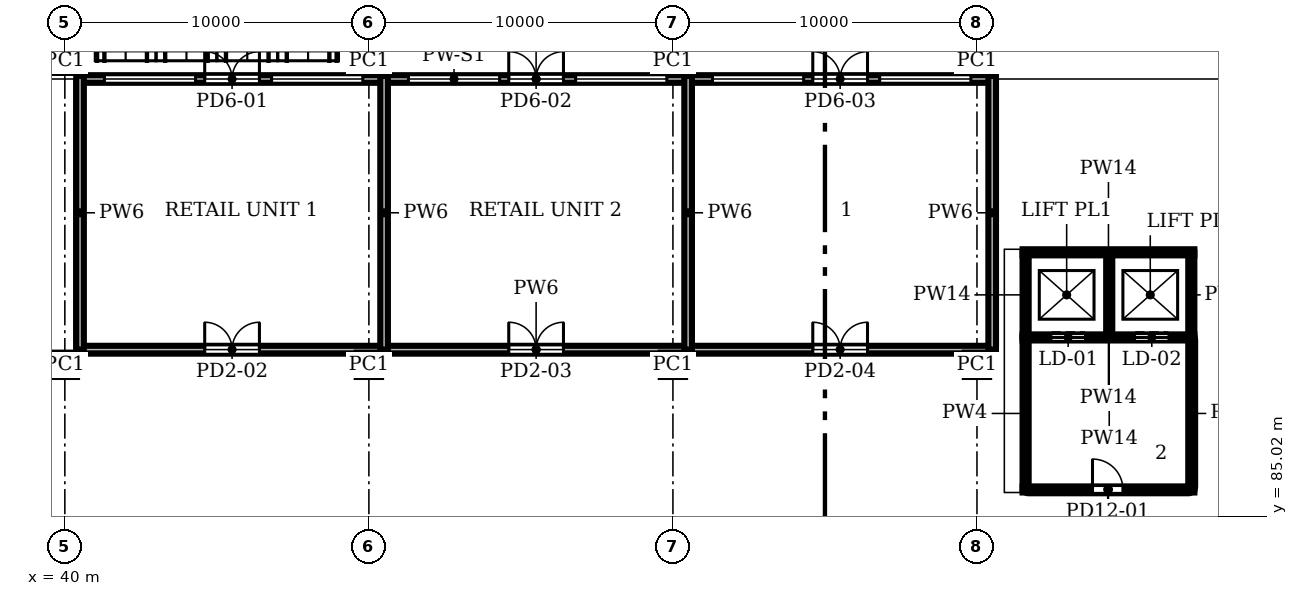
"""IFC4 building model, lengths in metres.
Left out: names, types, materials, properties, quantities, classifications, styles, units other than length and angle.
Written with IfcOpenShell. Run it as: python <this file> out.ifc"""

import sys

from ifc_helpers import new_model, si_unit, direction, frame, frame_2d, origin, origin_2d, place, context, subcontext, project, spatial, rectangle, extrude, element, fill, save


model = new_model("IFC4")
c1 = context("Model", 3, precision=1e-05, world=origin(), true_north=direction((0.0, 1.0)))
c2 = subcontext(c1, "Body", "Model", "MODEL_VIEW")
j1 = project(units=[si_unit("LENGTHUNIT", "METRE"), si_unit("PLANEANGLEUNIT", "RADIAN")], contexts=[c1])
p1 = place(None, origin())
s1 = spatial("IfcSite", under=j1, at=p1, CompositionType="ELEMENT")
p2 = place(p1, origin())
s2 = spatial("IfcBuilding", under=s1, at=p2, CompositionType="ELEMENT")
p3 = place(p2, origin())
s3 = spatial("IfcBuildingStorey", under=s2, at=p3, CompositionType="ELEMENT", Elevation=0.0)
for number, where, z_axis, x_axis in (
    (1, (40.0, 90.0, -0.1), (0.0, 0.0, 1.0), (1.0, 0.0, 0.0)),
    (2, (40.0, 100.0, -0.1), (0.0, 0.0, 1.0), (1.0, 0.0, 0.0)),
    (3, (50.0, 90.0, -0.1), (0.0, 0.0, 1.0), (1.0, 0.0, 0.0)),
    (4, (50.0, 100.0, -0.1), (0.0, 0.0, 1.0), (1.0, 0.0, 0.0)),
    (5, (60.0, 90.0, -0.1), (0.0, 0.0, 1.0), (1.0, 0.0, 0.0)),
    (6, (60.0, 100.0, -0.1), (0.0, 0.0, 1.0), (1.0, 0.0, 0.0)),
    (7, (70.0, 90.0, -0.1), (0.0, 0.0, 1.0), (1.0, 0.0, 0.0)),
    (8, (70.0, 100.0, -0.1), (0.0, 0.0, 1.0), (1.0, 0.0, 0.0)),
):
    element("IfcColumn", number, at=place(p3, frame(where, z_axis=z_axis, x_axis=x_axis)), inside=s3, PredefinedType="COLUMN", context=c2, shape_type="SweptSolid", body=[
        extrude(rectangle(XDim=0.8, YDim=0.8, at=origin_2d()), origin(), (0.0, 0.0, 1.0), 5.65),
    ])
p4 = place(p3, frame((40.5, 99.4, 0.0), z_axis=(0.0, 0.0, 1.0), x_axis=(1.0, 0.0, 0.0)))
e9 = element("IfcWall", 9, at=p4, inside=s3, PredefinedType="STANDARD", context=c2, shape_type="SweptSolid", body=[
    extrude(rectangle(XDim=30.0, YDim=0.25, at=frame_2d((15.0, 0.0))), origin(), (0.0, 0.0, 1.0), 5.55),
])
p5 = place(p4, frame((0.8, 0.0, 0.3)))
e10 = element("IfcOpeningElement", 10, at=p5, cuts=e9, PredefinedType="OPENING", context=c2, shape_type="SweptSolid", body=[
    extrude(rectangle(XDim=3.0, YDim=2.6, at=frame_2d((1.5, 1.3))), frame((0.0, 0.135, 0.0), z_axis=(0.0, -1.0, 0.0), x_axis=(1.0, 0.0, 0.0)), (0.0, 0.0, 1.0), 0.27),
])
p6 = place(p4, frame((4.1, 0.0, 0.0)))
e11 = element("IfcOpeningElement", 11, at=p6, cuts=e9, PredefinedType="OPENING", context=c2, shape_type="SweptSolid", body=[
    extrude(rectangle(XDim=1.8, YDim=2.4, at=frame_2d((0.9, 1.2))), frame((0.0, 0.135, 0.0), z_axis=(0.0, -1.0, 0.0), x_axis=(1.0, 0.0, 0.0)), (0.0, 0.0, 1.0), 0.27),
])
p7 = place(p4, frame((6.3, 0.0, 0.3)))
e12 = element("IfcOpeningElement", 12, at=p7, cuts=e9, PredefinedType="OPENING", context=c2, shape_type="SweptSolid", body=[
    extrude(rectangle(XDim=3.0, YDim=2.6, at=frame_2d((1.5, 1.3))), frame((0.0, 0.135, 0.0), z_axis=(0.0, -1.0, 0.0), x_axis=(1.0, 0.0, 0.0)), (0.0, 0.0, 1.0), 0.27),
])
p8 = place(p4, frame((10.8, 0.0, 0.3)))
e13 = element("IfcOpeningElement", 13, at=p8, cuts=e9, PredefinedType="OPENING", context=c2, shape_type="SweptSolid", body=[
    extrude(rectangle(XDim=3.0, YDim=2.6, at=frame_2d((1.5, 1.3))), frame((0.0, 0.135, 0.0), z_axis=(0.0, -1.0, 0.0), x_axis=(1.0, 0.0, 0.0)), (0.0, 0.0, 1.0), 0.27),
])
p9 = place(p4, frame((14.1, 0.0, 0.0)))
e14 = element("IfcOpeningElement", 14, at=p9, cuts=e9, PredefinedType="OPENING", context=c2, shape_type="SweptSolid", body=[
    extrude(rectangle(XDim=1.8, YDim=2.4, at=frame_2d((0.9, 1.2))), frame((0.0, 0.135, 0.0), z_axis=(0.0, -1.0, 0.0), x_axis=(1.0, 0.0, 0.0)), (0.0, 0.0, 1.0), 0.27),
])
p10 = place(p4, frame((16.3, 0.0, 0.3)))
e15 = element("IfcOpeningElement", 15, at=p10, cuts=e9, PredefinedType="OPENING", context=c2, shape_type="SweptSolid", body=[
    extrude(rectangle(XDim=3.0, YDim=2.6, at=frame_2d((1.5, 1.3))), frame((0.0, 0.135, 0.0), z_axis=(0.0, -1.0, 0.0), x_axis=(1.0, 0.0, 0.0)), (0.0, 0.0, 1.0), 0.27),
])
p11 = place(p4, frame((20.8, 0.0, 0.3)))
e16 = element("IfcOpeningElement", 16, at=p11, cuts=e9, PredefinedType="OPENING", context=c2, shape_type="SweptSolid", body=[
    extrude(rectangle(XDim=3.0, YDim=2.6, at=frame_2d((1.5, 1.3))), frame((0.0, 0.135, 0.0), z_axis=(0.0, -1.0, 0.0), x_axis=(1.0, 0.0, 0.0)), (0.0, 0.0, 1.0), 0.27),
])
p12 = place(p4, frame((24.1, 0.0, 0.0)))
e17 = element("IfcOpeningElement", 17, at=p12, cuts=e9, PredefinedType="OPENING", context=c2, shape_type="SweptSolid", body=[
    extrude(rectangle(XDim=1.8, YDim=2.4, at=frame_2d((0.9, 1.2))), frame((0.0, 0.135, 0.0), z_axis=(0.0, -1.0, 0.0), x_axis=(1.0, 0.0, 0.0)), (0.0, 0.0, 1.0), 0.27),
])
p13 = place(p4, frame((26.3, 0.0, 0.3)))
e18 = element("IfcOpeningElement", 18, at=p13, cuts=e9, PredefinedType="OPENING", context=c2, shape_type="SweptSolid", body=[
    extrude(rectangle(XDim=3.0, YDim=2.6, at=frame_2d((1.5, 1.3))), frame((0.0, 0.135, 0.0), z_axis=(0.0, -1.0, 0.0), x_axis=(1.0, 0.0, 0.0)), (0.0, 0.0, 1.0), 0.27),
])
p14 = place(p3, frame((40.5, 90.5, 0.0), z_axis=(0.0, 0.0, 1.0), x_axis=(1.0, 0.0, 0.0)))
e19 = element("IfcWall", 19, at=p14, inside=s3, PredefinedType="STANDARD", context=c2, shape_type="SweptSolid", body=[
    extrude(rectangle(XDim=30.0, YDim=0.25, at=frame_2d((15.0, 0.0))), origin(), (0.0, 0.0, 1.0), 5.55),
])
p15 = place(p14, frame((4.1, 0.0, 0.0)))
e20 = element("IfcOpeningElement", 20, at=p15, cuts=e19, PredefinedType="OPENING", context=c2, shape_type="SweptSolid", body=[
    extrude(rectangle(XDim=1.8, YDim=2.1, at=frame_2d((0.9, 1.05))), frame((0.0, 0.135, 0.0), z_axis=(0.0, -1.0, 0.0), x_axis=(1.0, 0.0, 0.0)), (0.0, 0.0, 1.0), 0.27),
])
p16 = place(p14, frame((14.1, 0.0, 0.0)))
e21 = element("IfcOpeningElement", 21, at=p16, cuts=e19, PredefinedType="OPENING", context=c2, shape_type="SweptSolid", body=[
    extrude(rectangle(XDim=1.8, YDim=2.1, at=frame_2d((0.9, 1.05))), frame((0.0, 0.135, 0.0), z_axis=(0.0, -1.0, 0.0), x_axis=(1.0, 0.0, 0.0)), (0.0, 0.0, 1.0), 0.27),
])
p17 = place(p14, frame((24.1, 0.0, 0.0)))
e22 = element("IfcOpeningElement", 22, at=p17, cuts=e19, PredefinedType="OPENING", context=c2, shape_type="SweptSolid", body=[
    extrude(rectangle(XDim=1.8, YDim=2.1, at=frame_2d((0.9, 1.05))), frame((0.0, 0.135, 0.0), z_axis=(0.0, -1.0, 0.0), x_axis=(1.0, 0.0, 0.0)), (0.0, 0.0, 1.0), 0.27),
])
for number, where, z_axis, x_axis in (
    (23, (40.5, 90.5, 0.0), (0.0, 0.0, 1.0), (0.0, 1.0, 0.0)),
    (24, (50.5, 90.5, 0.0), (0.0, 0.0, 1.0), (0.0, 1.0, 0.0)),
    (25, (60.5, 90.5, 0.0), (0.0, 0.0, 1.0), (0.0, 1.0, 0.0)),
    (26, (70.5, 90.5, 0.0), (0.0, 0.0, 1.0), (0.0, 1.0, 0.0)),
):
    element("IfcWall", number, at=place(p3, frame(where, z_axis=z_axis, x_axis=x_axis)), inside=s3, PredefinedType="STANDARD", context=c2, shape_type="SweptSolid", body=[
        extrude(rectangle(XDim=9.0, YDim=0.25, at=frame_2d((4.5, 0.0))), origin(), (0.0, 0.0, 1.0), 5.55),
    ])
p18 = place(p3, frame((71.5, 90.9, 0.0), z_axis=(0.0, 0.0, 1.0), x_axis=(1.0, 0.0, 0.0)))
e27 = element("IfcWall", 27, at=p18, inside=s3, PredefinedType="SOLIDWALL", context=c2, shape_type="SweptSolid", body=[
    extrude(rectangle(XDim=5.65, YDim=0.2, at=frame_2d((2.825, 0.0))), origin(), (0.0, 0.0, 1.0), 6.0),
])
p19 = place(p18, frame((0.95, 0.0, 0.0)))
e28 = element("IfcOpeningElement", 28, at=p19, cuts=e27, PredefinedType="OPENING", context=c2, shape_type="SweptSolid", body=[
    extrude(rectangle(XDim=1.1, YDim=2.1, at=frame_2d((0.55, 1.05))), frame((0.0, 0.11, 0.0), z_axis=(0.0, -1.0, 0.0), x_axis=(1.0, 0.0, 0.0)), (0.0, 0.0, 1.0), 0.22),
])
p20 = place(p18, frame((3.7, 0.0, 0.0)))
e29 = element("IfcOpeningElement", 29, at=p20, cuts=e27, PredefinedType="OPENING", context=c2, shape_type="SweptSolid", body=[
    extrude(rectangle(XDim=1.1, YDim=2.1, at=frame_2d((0.55, 1.05))), frame((0.0, 0.11, 0.0), z_axis=(0.0, -1.0, 0.0), x_axis=(1.0, 0.0, 0.0)), (0.0, 0.0, 1.0), 0.22),
])
p21 = place(p3, frame((71.5, 93.7, 0.0), z_axis=(0.0, 0.0, 1.0), x_axis=(1.0, 0.0, 0.0)))
e30 = element("IfcWall", 30, at=p21, inside=s3, PredefinedType="SOLIDWALL", context=c2, shape_type="SweptSolid", body=[
    extrude(rectangle(XDim=5.65, YDim=0.2, at=frame_2d((2.825, 0.0))), origin(), (0.0, 0.0, 1.0), 6.0),
])
for number, where, z_axis, x_axis in (
    (31, (71.6, 90.9, 0.0), (0.0, 0.0, 1.0), (0.0, 1.0, 0.0)),
    (32, (74.35, 90.9, 0.0), (0.0, 0.0, 1.0), (0.0, 1.0, 0.0)),
    (33, (77.05, 90.9, 0.0), (0.0, 0.0, 1.0), (0.0, 1.0, 0.0)),
):
    element("IfcWall", number, at=place(p3, frame(where, z_axis=z_axis, x_axis=x_axis)), inside=s3, PredefinedType="SOLIDWALL", context=c2, shape_type="SweptSolid", body=[
        extrude(rectangle(XDim=2.8, YDim=0.2, at=frame_2d((1.4, 0.0))), origin(), (0.0, 0.0, 1.0), 6.0),
    ])
for number, where, z_axis, x_axis in (
    (34, (71.6, 85.9, 0.0), (0.0, 0.0, 1.0), (0.0, 1.0, 0.0)),
    (35, (77.05, 85.9, 0.0), (0.0, 0.0, 1.0), (0.0, 1.0, 0.0)),
):
    element("IfcWall", number, at=place(p3, frame(where, z_axis=z_axis, x_axis=x_axis)), inside=s3, PredefinedType="PARTITIONING", context=c2, shape_type="SweptSolid", body=[
        extrude(rectangle(XDim=5.0, YDim=0.2, at=frame_2d((2.5, 0.0))), origin(), (0.0, 0.0, 1.0), 5.55),
    ])
p22 = place(p3, frame((71.5, 85.9, 0.0), z_axis=(0.0, 0.0, 1.0), x_axis=(1.0, 0.0, 0.0)))
e36 = element("IfcWall", 36, at=p22, inside=s3, PredefinedType="PARTITIONING", context=c2, shape_type="SweptSolid", body=[
    extrude(rectangle(XDim=5.65, YDim=0.2, at=frame_2d((2.825, 0.0))), origin(), (0.0, 0.0, 1.0), 5.55),
])
p23 = place(p22, frame((2.3, 0.0, 0.0)))
e37 = element("IfcOpeningElement", 37, at=p23, cuts=e36, PredefinedType="OPENING", context=c2, shape_type="SweptSolid", body=[
    extrude(rectangle(XDim=1.0, YDim=2.1, at=frame_2d((0.5, 1.05))), frame((0.0, 0.11, 0.0), z_axis=(0.0, -1.0, 0.0), x_axis=(1.0, 0.0, 0.0)), (0.0, 0.0, 1.0), 0.22),
])
p24 = place(p5, origin())
e38 = element("IfcWindow", 38, at=p24, inside=s3, PartitioningType="SINGLE_PANEL", PredefinedType="WINDOW", context=c2, shape_type="SweptSolid", body=[
    extrude(rectangle(XDim=3.0, YDim=2.6, at=frame_2d((1.5, 1.3))), frame((0.0, 0.03, 0.0), z_axis=(0.0, -1.0, 0.0), x_axis=(1.0, 0.0, 0.0)), (0.0, 0.0, 1.0), 0.06),
])
fill(e10, e38)
p25 = place(p6, origin())
e39 = element("IfcDoor", 39, at=p25, inside=s3, OperationType="DOUBLE_DOOR_SINGLE_SWING", PredefinedType="DOOR", context=c2, shape_type="SweptSolid", body=[
    extrude(rectangle(XDim=1.8, YDim=2.4, at=frame_2d((0.9, 1.2))), frame((0.0, 0.025, 0.0), z_axis=(0.0, -1.0, 0.0), x_axis=(1.0, 0.0, 0.0)), (0.0, 0.0, 1.0), 0.05),
])
fill(e11, e39)
p26 = place(p7, origin())
e40 = element("IfcWindow", 40, at=p26, inside=s3, PartitioningType="SINGLE_PANEL", PredefinedType="WINDOW", context=c2, shape_type="SweptSolid", body=[
    extrude(rectangle(XDim=3.0, YDim=2.6, at=frame_2d((1.5, 1.3))), frame((0.0, 0.03, 0.0), z_axis=(0.0, -1.0, 0.0), x_axis=(1.0, 0.0, 0.0)), (0.0, 0.0, 1.0), 0.06),
])
fill(e12, e40)
p27 = place(p15, origin())
e41 = element("IfcDoor", 41, at=p27, inside=s3, OperationType="DOUBLE_DOOR_SINGLE_SWING", PredefinedType="DOOR", context=c2, shape_type="SweptSolid", body=[
    extrude(rectangle(XDim=1.8, YDim=2.1, at=frame_2d((0.9, 1.05))), frame((0.0, 0.025, 0.0), z_axis=(0.0, -1.0, 0.0), x_axis=(1.0, 0.0, 0.0)), (0.0, 0.0, 1.0), 0.05),
])
fill(e20, e41)
p28 = place(p8, origin())
e42 = element("IfcWindow", 42, at=p28, inside=s3, PartitioningType="SINGLE_PANEL", PredefinedType="WINDOW", context=c2, shape_type="SweptSolid", body=[
    extrude(rectangle(XDim=3.0, YDim=2.6, at=frame_2d((1.5, 1.3))), frame((0.0, 0.03, 0.0), z_axis=(0.0, -1.0, 0.0), x_axis=(1.0, 0.0, 0.0)), (0.0, 0.0, 1.0), 0.06),
])
fill(e13, e42)
p29 = place(p9, origin())
e43 = element("IfcDoor", 43, at=p29, inside=s3, OperationType="DOUBLE_DOOR_SINGLE_SWING", PredefinedType="DOOR", context=c2, shape_type="SweptSolid", body=[
    extrude(rectangle(XDim=1.8, YDim=2.4, at=frame_2d((0.9, 1.2))), frame((0.0, 0.025, 0.0), z_axis=(0.0, -1.0, 0.0), x_axis=(1.0, 0.0, 0.0)), (0.0, 0.0, 1.0), 0.05),
])
fill(e14, e43)
p30 = place(p10, origin())
e44 = element("IfcWindow", 44, at=p30, inside=s3, PartitioningType="SINGLE_PANEL", PredefinedType="WINDOW", context=c2, shape_type="SweptSolid", body=[
    extrude(rectangle(XDim=3.0, YDim=2.6, at=frame_2d((1.5, 1.3))), frame((0.0, 0.03, 0.0), z_axis=(0.0, -1.0, 0.0), x_axis=(1.0, 0.0, 0.0)), (0.0, 0.0, 1.0), 0.06),
])
fill(e15, e44)
p31 = place(p16, origin())
e45 = element("IfcDoor", 45, at=p31, inside=s3, OperationType="DOUBLE_DOOR_SINGLE_SWING", PredefinedType="DOOR", context=c2, shape_type="SweptSolid", body=[
    extrude(rectangle(XDim=1.8, YDim=2.1, at=frame_2d((0.9, 1.05))), frame((0.0, 0.025, 0.0), z_axis=(0.0, -1.0, 0.0), x_axis=(1.0, 0.0, 0.0)), (0.0, 0.0, 1.0), 0.05),
])
fill(e21, e45)
p32 = place(p11, origin())
e46 = element("IfcWindow", 46, at=p32, inside=s3, PartitioningType="SINGLE_PANEL", PredefinedType="WINDOW", context=c2, shape_type="SweptSolid", body=[
    extrude(rectangle(XDim=3.0, YDim=2.6, at=frame_2d((1.5, 1.3))), frame((0.0, 0.03, 0.0), z_axis=(0.0, -1.0, 0.0), x_axis=(1.0, 0.0, 0.0)), (0.0, 0.0, 1.0), 0.06),
])
fill(e16, e46)
p33 = place(p12, origin())
e47 = element("IfcDoor", 47, at=p33, inside=s3, OperationType="DOUBLE_DOOR_SINGLE_SWING", PredefinedType="DOOR", context=c2, shape_type="SweptSolid", body=[
    extrude(rectangle(XDim=1.8, YDim=2.4, at=frame_2d((0.9, 1.2))), frame((0.0, 0.025, 0.0), z_axis=(0.0, -1.0, 0.0), x_axis=(1.0, 0.0, 0.0)), (0.0, 0.0, 1.0), 0.05),
])
fill(e17, e47)
p34 = place(p13, origin())
e48 = element("IfcWindow", 48, at=p34, inside=s3, PartitioningType="SINGLE_PANEL", PredefinedType="WINDOW", context=c2, shape_type="SweptSolid", body=[
    extrude(rectangle(XDim=3.0, YDim=2.6, at=frame_2d((1.5, 1.3))), frame((0.0, 0.03, 0.0), z_axis=(0.0, -1.0, 0.0), x_axis=(1.0, 0.0, 0.0)), (0.0, 0.0, 1.0), 0.06),
])
fill(e18, e48)
p35 = place(p17, origin())
e49 = element("IfcDoor", 49, at=p35, inside=s3, OperationType="DOUBLE_DOOR_SINGLE_SWING", PredefinedType="DOOR", context=c2, shape_type="SweptSolid", body=[
    extrude(rectangle(XDim=1.8, YDim=2.1, at=frame_2d((0.9, 1.05))), frame((0.0, 0.025, 0.0), z_axis=(0.0, -1.0, 0.0), x_axis=(1.0, 0.0, 0.0)), (0.0, 0.0, 1.0), 0.05),
])
fill(e22, e49)
p36 = place(p19, origin())
e50 = element("IfcDoor", 50, at=p36, inside=s3, OperationType="DOUBLE_DOOR_SLIDING", PredefinedType="DOOR", context=c2, shape_type="SweptSolid", body=[
    extrude(rectangle(XDim=1.1, YDim=2.1, at=frame_2d((0.55, 1.05))), frame((0.0, 0.025, 0.0), z_axis=(0.0, -1.0, 0.0), x_axis=(1.0, 0.0, 0.0)), (0.0, 0.0, 1.0), 0.05),
])
fill(e28, e50)
p37 = place(p20, origin())
e51 = element("IfcDoor", 51, at=p37, inside=s3, OperationType="DOUBLE_DOOR_SLIDING", PredefinedType="DOOR", context=c2, shape_type="SweptSolid", body=[
    extrude(rectangle(XDim=1.1, YDim=2.1, at=frame_2d((0.55, 1.05))), frame((0.0, 0.025, 0.0), z_axis=(0.0, -1.0, 0.0), x_axis=(1.0, 0.0, 0.0)), (0.0, 0.0, 1.0), 0.05),
])
fill(e29, e51)
p38 = place(p23, origin())
e52 = element("IfcDoor", 52, at=p38, inside=s3, OperationType="SINGLE_SWING_LEFT", PredefinedType="DOOR", context=c2, shape_type="SweptSolid", body=[
    extrude(rectangle(XDim=1.0, YDim=2.1, at=frame_2d((0.5, 1.05))), frame((0.0, 0.025, 0.0), z_axis=(0.0, -1.0, 0.0), x_axis=(1.0, 0.0, 0.0)), (0.0, 0.0, 1.0), 0.05),
])
fill(e37, e52)
save(model, sys.argv[1])
